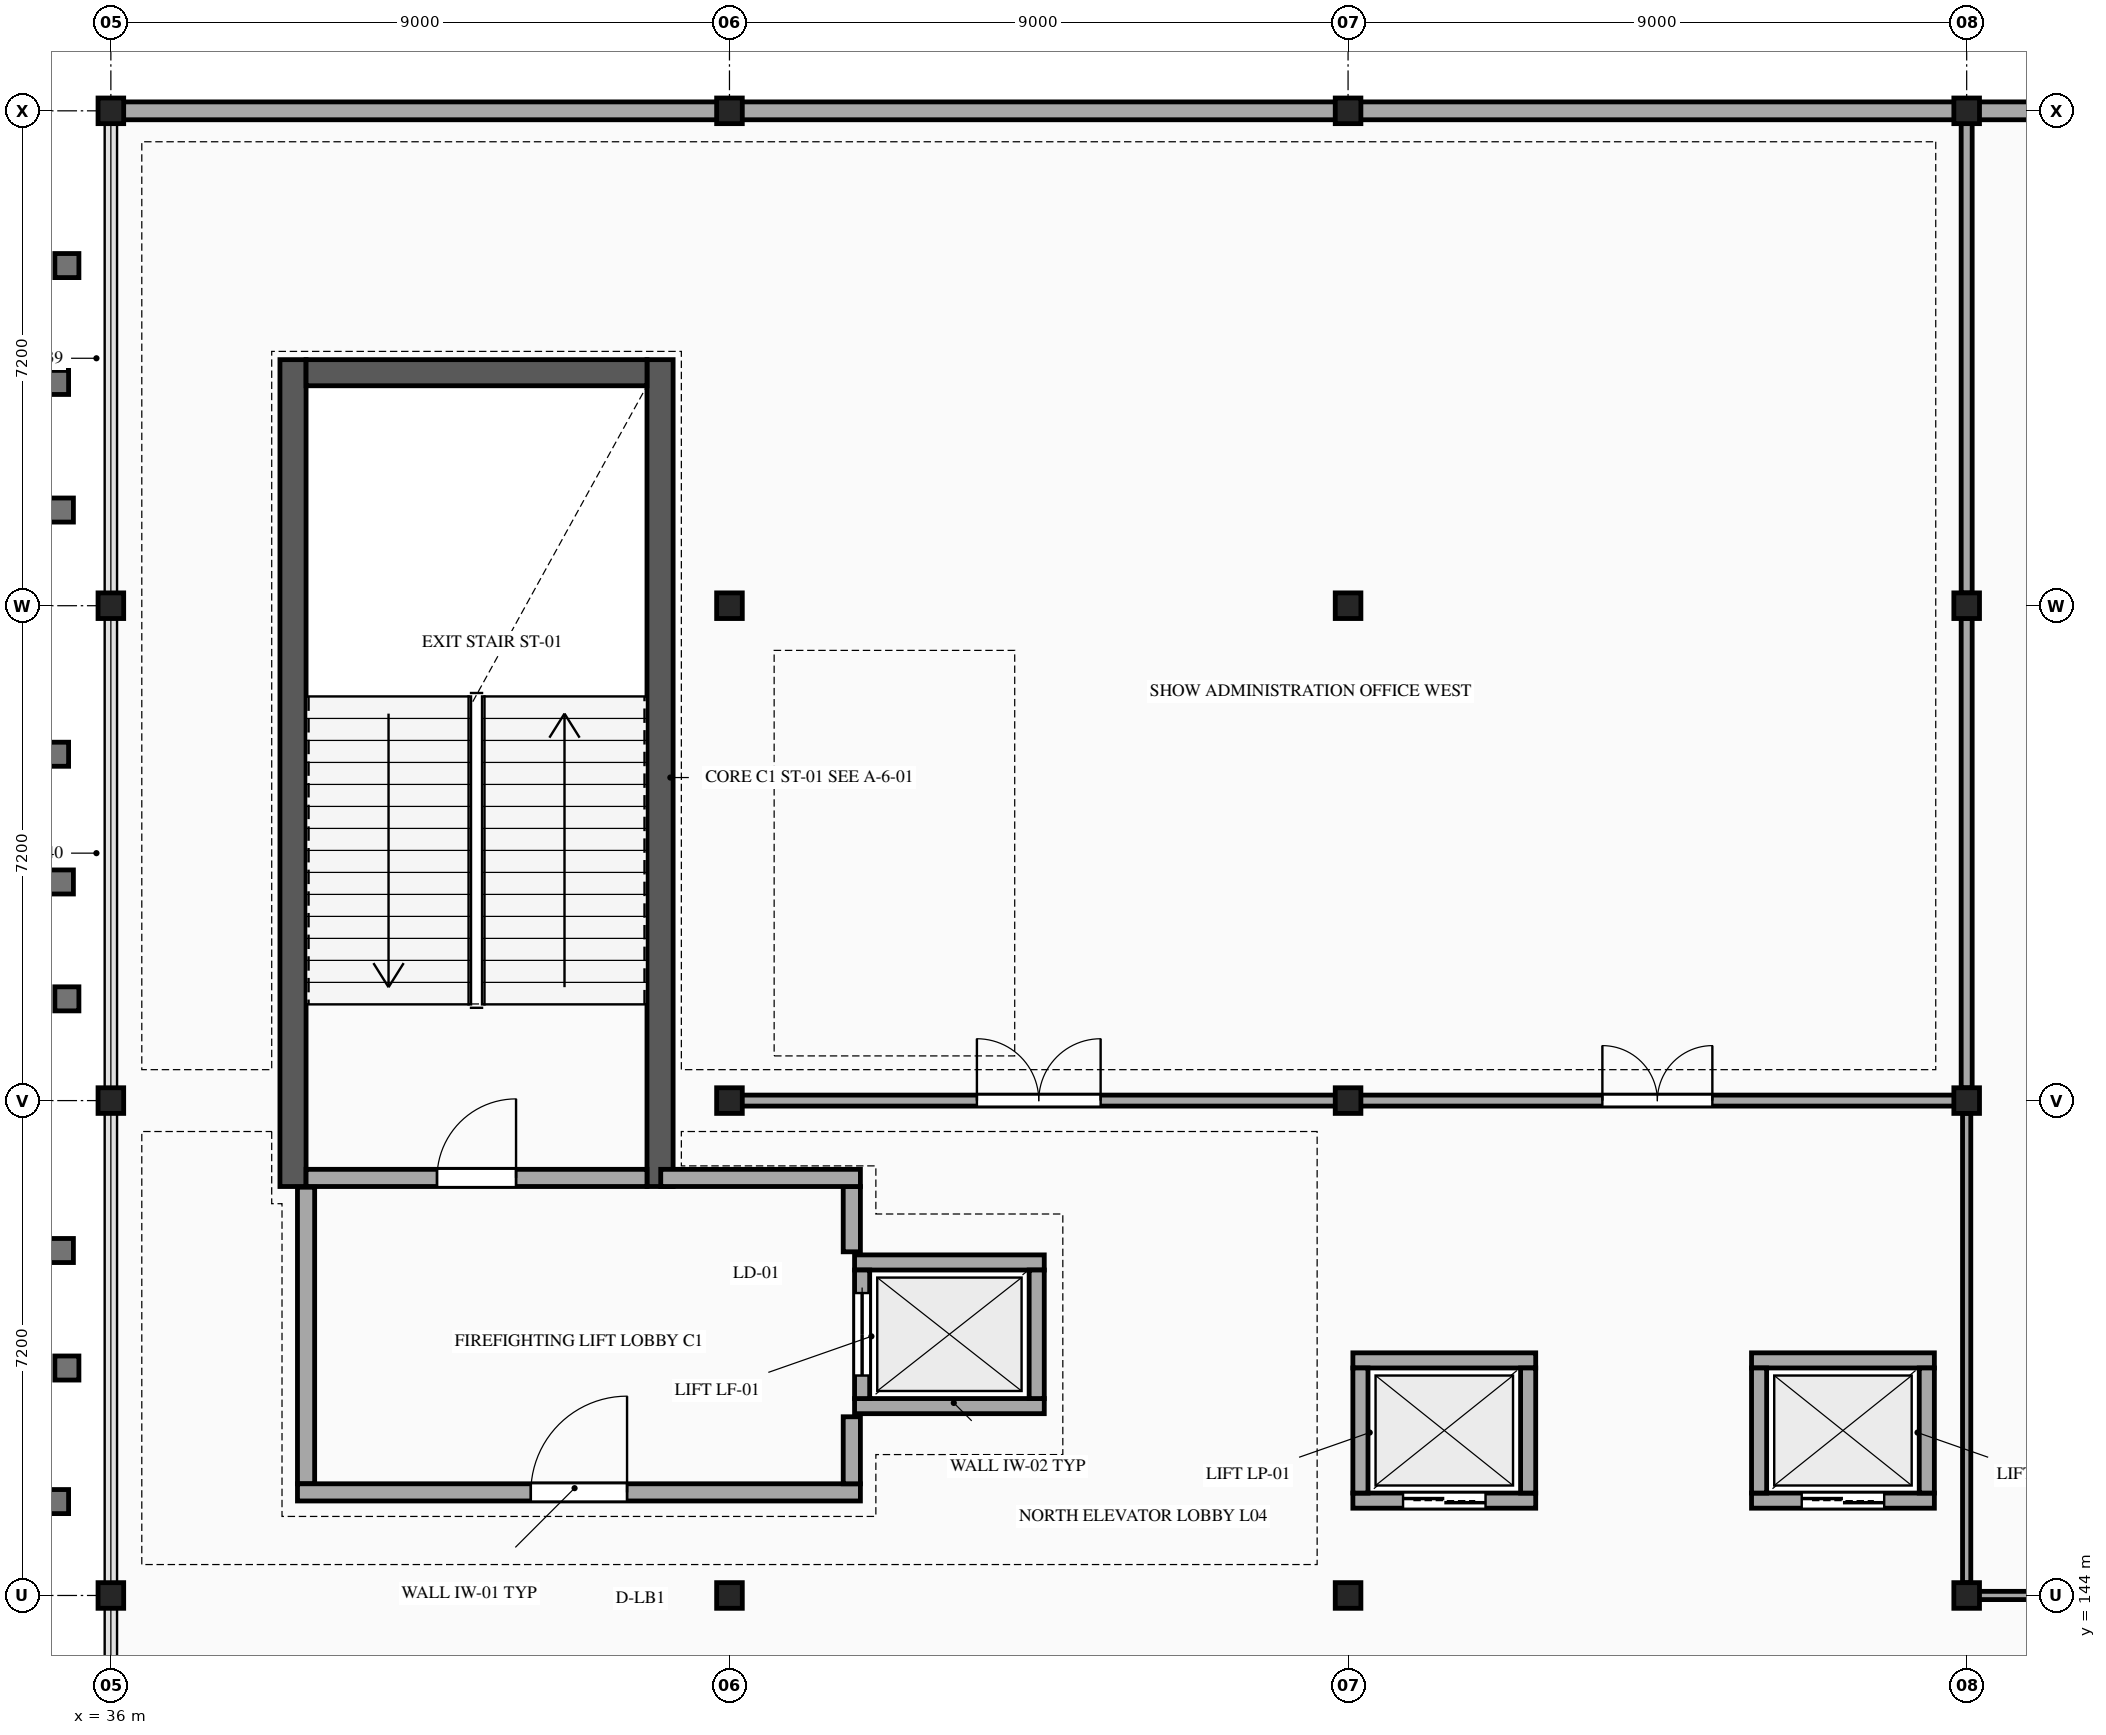
"""IFC4 building model, lengths in metres.
Left out: names, types, materials, properties, quantities, classifications, styles, units other than length and angle.
Written with IfcOpenShell. Run it as: python <this file> out.ifc"""

import sys

from ifc_helpers import new_model, si_unit, direction, frame, frame_2d, origin, origin_2d, place, context, subcontext, project, spatial, rectangle, i_section, extrude, element, fill, save


model = new_model("IFC4")
c1 = context("Model", 3, precision=1e-05, world=origin(), true_north=direction((0.0, 1.0)))
c2 = subcontext(c1, "Body", "Model", "MODEL_VIEW")
j1 = project(units=[si_unit("LENGTHUNIT", "METRE"), si_unit("PLANEANGLEUNIT", "RADIAN")], contexts=[c1])
p1 = place(None, origin())
s1 = spatial("IfcSite", under=j1, at=p1, CompositionType="ELEMENT")
p2 = place(p1, origin())
s2 = spatial("IfcBuilding", under=s1, at=p2, CompositionType="ELEMENT")
p3 = place(p2, frame((0.0, 0.0, 19.8)))
s3 = spatial("IfcBuildingStorey", under=s2, at=p3, CompositionType="ELEMENT", Elevation=19.8)
for number, where, z_axis, x_axis in (
    (1, (36.0, 144.0, 0.0), (0.0, 0.0, 1.0), (1.0, 0.0, 0.0)),
    (2, (36.0, 151.2, 0.0), (0.0, 0.0, 1.0), (1.0, 0.0, 0.0)),
    (3, (36.0, 158.4, 0.0), (0.0, 0.0, 1.0), (1.0, 0.0, 0.0)),
    (4, (36.0, 165.6, 0.0), (0.0, 0.0, 1.0), (1.0, 0.0, 0.0)),
    (5, (45.0, 144.0, 0.0), (0.0, 0.0, 1.0), (1.0, 0.0, 0.0)),
    (6, (45.0, 151.2, 0.0), (0.0, 0.0, 1.0), (1.0, 0.0, 0.0)),
    (7, (45.0, 158.4, 0.0), (0.0, 0.0, 1.0), (1.0, 0.0, 0.0)),
    (8, (45.0, 165.6, 0.0), (0.0, 0.0, 1.0), (1.0, 0.0, 0.0)),
    (9, (54.0, 144.0, 0.0), (0.0, 0.0, 1.0), (1.0, 0.0, 0.0)),
    (10, (54.0, 151.2, 0.0), (0.0, 0.0, 1.0), (1.0, 0.0, 0.0)),
    (11, (54.0, 158.4, 0.0), (0.0, 0.0, 1.0), (1.0, 0.0, 0.0)),
    (12, (54.0, 165.6, 0.0), (0.0, 0.0, 1.0), (1.0, 0.0, 0.0)),
    (13, (63.0, 144.0, 0.0), (0.0, 0.0, 1.0), (1.0, 0.0, 0.0)),
    (14, (63.0, 151.2, 0.0), (0.0, 0.0, 1.0), (1.0, 0.0, 0.0)),
    (15, (63.0, 158.4, 0.0), (0.0, 0.0, 1.0), (1.0, 0.0, 0.0)),
    (16, (63.0, 165.6, 0.0), (0.0, 0.0, 1.0), (1.0, 0.0, 0.0)),
):
    element("IfcColumn", number, at=place(p3, frame(where, z_axis=z_axis, x_axis=x_axis)), inside=s3, PredefinedType="COLUMN", context=c2, shape_type="SweptSolid", body=[
        extrude(i_section(OverallWidth=0.373, OverallDepth=0.373, WebThickness=0.016, FlangeThickness=0.026, at=origin_2d()), origin(), (0.0, 0.0, 1.0), 4.5),
    ])
for number, where, z_axis, x_axis in (
    (17, (38.65, 149.95, 0.0), (0.0, 0.0, 1.0), (0.0, 1.0, 0.0)),
    (18, (43.99, 161.98, 0.0), (0.0, 0.0, 1.0), (0.0, -1.0, 0.0)),
):
    element("IfcWall", number, at=place(p3, frame(where, z_axis=z_axis, x_axis=x_axis)), inside=s3, PredefinedType="SHEAR", context=c2, shape_type="SweptSolid", body=[
        extrude(rectangle(XDim=12.03, YDim=0.38, at=frame_2d((6.015, 0.0))), origin(), (0.0, 0.0, 1.0), 4.26),
    ])
p4 = place(p3, frame((38.84, 161.79, 0.0), z_axis=(0.0, 0.0, 1.0), x_axis=(1.0, 0.0, 0.0)))
e19 = element("IfcWall", 19, at=p4, inside=s3, PredefinedType="SHEAR", context=c2, shape_type="SweptSolid", body=[
    extrude(rectangle(XDim=4.96, YDim=0.38, at=frame_2d((2.48, 0.0))), origin(), (0.0, 0.0, 1.0), 4.26),
])
for number, where, z_axis, x_axis in (
    (20, (36.006, 165.6, 0.0), (0.0, 0.0, 1.0), (1.0, 0.0, 0.0)),
    (21, (45.006, 165.6, 0.0), (0.0, 0.0, 1.0), (1.0, 0.0, 0.0)),
    (22, (54.006, 165.6, 0.0), (0.0, 0.0, 1.0), (1.0, 0.0, 0.0)),
):
    element("IfcWall", number, at=place(p3, frame(where, z_axis=z_axis, x_axis=x_axis)), inside=s3, PredefinedType="STANDARD", context=c2, shape_type="SweptSolid", body=[
        extrude(rectangle(XDim=8.988, YDim=0.26, at=frame_2d((4.494, 0.0))), origin(), (0.0, 0.0, 1.0), 3.648),
    ])
p5 = place(p3, frame((63.006, 165.6, 0.0), z_axis=(0.0, 0.0, 1.0), x_axis=(1.0, 0.0, 0.0)))
e23 = element("IfcWall", 23, at=p5, inside=s3, PredefinedType="STANDARD", context=c2, shape_type="SweptSolid", body=[
    extrude(rectangle(XDim=8.989, YDim=0.26, at=frame_2d((4.495, 0.0))), origin(), (0.0, 0.0, 1.0), 3.648),
])
p6 = place(p3, frame((38.84, 150.075, 0.0), z_axis=(0.0, 0.0, 1.0), x_axis=(1.0, 0.0, 0.0)))
e24 = element("IfcWall", 24, at=p6, inside=s3, PredefinedType="STANDARD", context=c2, shape_type="SweptSolid", body=[
    extrude(rectangle(XDim=4.96, YDim=0.25, at=frame_2d((2.48, 0.0))), origin(), (0.0, 0.0, 1.0), 4.25),
])
p7 = place(p6, frame((1.905, 0.0, 0.0)))
e25 = element("IfcOpeningElement", 25, at=p7, cuts=e24, PredefinedType="OPENING", context=c2, shape_type="SweptSolid", body=[
    extrude(rectangle(XDim=1.15, YDim=2.2, at=frame_2d((0.575, 1.1))), frame((0.0, 0.135, 0.0), z_axis=(0.0, -1.0, 0.0), x_axis=(1.0, 0.0, 0.0)), (0.0, 0.0, 1.0), 0.27),
])
for number, where, z_axis, x_axis in (
    (26, (46.82, 146.755, 0.0), (0.0, 0.0, 1.0), (1.0, 0.0, 0.0)),
    (27, (49.58, 148.845, 0.0), (0.0, 0.0, 1.0), (-1.0, 0.0, 0.0)),
):
    element("IfcWall", number, at=place(p3, frame(where, z_axis=z_axis, x_axis=x_axis)), inside=s3, PredefinedType="STANDARD", context=c2, shape_type="SweptSolid", body=[
        extrude(rectangle(XDim=2.76, YDim=0.22, at=frame_2d((1.38, 0.0))), origin(), (0.0, 0.0, 1.0), 4.25),
    ])
p8 = place(p3, frame((46.93, 148.735, 0.0), z_axis=(0.0, 0.0, 1.0), x_axis=(0.0, -1.0, 0.0)))
e28 = element("IfcWall", 28, at=p8, inside=s3, PredefinedType="STANDARD", context=c2, shape_type="SweptSolid", body=[
    extrude(rectangle(XDim=1.87, YDim=0.22, at=frame_2d((0.935, 0.0))), origin(), (0.0, 0.0, 1.0), 4.25),
])
p9 = place(p8, frame((0.335, 0.0, 0.0)))
e29 = element("IfcOpeningElement", 29, at=p9, cuts=e28, PredefinedType="OPENING", context=c2, shape_type="SweptSolid", body=[
    extrude(rectangle(XDim=1.2, YDim=2.2, at=frame_2d((0.6, 1.1))), frame((0.0, 0.12, 0.0), z_axis=(0.0, -1.0, 0.0), x_axis=(1.0, 0.0, 0.0)), (0.0, 0.0, 1.0), 0.24),
])
p10 = place(p3, frame((49.47, 146.865, 0.0), z_axis=(0.0, 0.0, 1.0), x_axis=(0.0, 1.0, 0.0)))
e30 = element("IfcWall", 30, at=p10, inside=s3, PredefinedType="STANDARD", context=c2, shape_type="SweptSolid", body=[
    extrude(rectangle(XDim=1.87, YDim=0.22, at=frame_2d((0.935, 0.0))), origin(), (0.0, 0.0, 1.0), 4.25),
])
p11 = place(p3, frame((54.07, 145.38, 0.0), z_axis=(0.0, 0.0, 1.0), x_axis=(1.0, 0.0, 0.0)))
e31 = element("IfcWall", 31, at=p11, inside=s3, PredefinedType="STANDARD", context=c2, shape_type="SweptSolid", body=[
    extrude(rectangle(XDim=2.66, YDim=0.22, at=frame_2d((1.33, 0.0))), origin(), (0.0, 0.0, 1.0), 3.648),
])
p12 = place(p11, frame((0.73, 0.0, 0.0)))
e32 = element("IfcOpeningElement", 32, at=p12, cuts=e31, PredefinedType="OPENING", context=c2, shape_type="SweptSolid", body=[
    extrude(rectangle(XDim=1.2, YDim=2.2, at=frame_2d((0.6, 1.1))), frame((0.0, 0.12, 0.0), z_axis=(0.0, -1.0, 0.0), x_axis=(1.0, 0.0, 0.0)), (0.0, 0.0, 1.0), 0.24),
])
p13 = place(p3, frame((56.73, 147.42, 0.0), z_axis=(0.0, 0.0, 1.0), x_axis=(-1.0, 0.0, 0.0)))
e33 = element("IfcWall", 33, at=p13, inside=s3, PredefinedType="STANDARD", context=c2, shape_type="SweptSolid", body=[
    extrude(rectangle(XDim=2.66, YDim=0.22, at=frame_2d((1.33, 0.0))), origin(), (0.0, 0.0, 1.0), 3.648),
])
for number, where, z_axis, x_axis in (
    (34, (54.18, 147.31, 0.0), (0.0, 0.0, 1.0), (0.0, -1.0, 0.0)),
    (35, (56.62, 145.49, 0.0), (0.0, 0.0, 1.0), (0.0, 1.0, 0.0)),
):
    element("IfcWall", number, at=place(p3, frame(where, z_axis=z_axis, x_axis=x_axis)), inside=s3, PredefinedType="STANDARD", context=c2, shape_type="SweptSolid", body=[
        extrude(rectangle(XDim=1.82, YDim=0.22, at=frame_2d((0.91, 0.0))), origin(), (0.0, 0.0, 1.0), 3.648),
    ])
p14 = place(p3, frame((59.87, 145.38, 0.0), z_axis=(0.0, 0.0, 1.0), x_axis=(1.0, 0.0, 0.0)))
e36 = element("IfcWall", 36, at=p14, inside=s3, PredefinedType="STANDARD", context=c2, shape_type="SweptSolid", body=[
    extrude(rectangle(XDim=2.66, YDim=0.22, at=frame_2d((1.33, 0.0))), origin(), (0.0, 0.0, 1.0), 4.25),
])
p15 = place(p14, frame((0.73, 0.0, 0.0)))
e37 = element("IfcOpeningElement", 37, at=p15, cuts=e36, PredefinedType="OPENING", context=c2, shape_type="SweptSolid", body=[
    extrude(rectangle(XDim=1.2, YDim=2.2, at=frame_2d((0.6, 1.1))), frame((0.0, 0.12, 0.0), z_axis=(0.0, -1.0, 0.0), x_axis=(1.0, 0.0, 0.0)), (0.0, 0.0, 1.0), 0.24),
])
p16 = place(p3, frame((62.53, 147.42, 0.0), z_axis=(0.0, 0.0, 1.0), x_axis=(-1.0, 0.0, 0.0)))
e38 = element("IfcWall", 38, at=p16, inside=s3, PredefinedType="STANDARD", context=c2, shape_type="SweptSolid", body=[
    extrude(rectangle(XDim=2.66, YDim=0.22, at=frame_2d((1.33, 0.0))), origin(), (0.0, 0.0, 1.0), 4.25),
])
for number, where, z_axis, x_axis in (
    (39, (59.98, 147.31, 0.0), (0.0, 0.0, 1.0), (0.0, -1.0, 0.0)),
    (40, (62.42, 145.49, 0.0), (0.0, 0.0, 1.0), (0.0, 1.0, 0.0)),
):
    element("IfcWall", number, at=place(p3, frame(where, z_axis=z_axis, x_axis=x_axis)), inside=s3, PredefinedType="STANDARD", context=c2, shape_type="SweptSolid", body=[
        extrude(rectangle(XDim=1.82, YDim=0.22, at=frame_2d((0.91, 0.0))), origin(), (0.0, 0.0, 1.0), 4.25),
    ])
p17 = place(p3, frame((38.84, 149.94, 0.0), z_axis=(0.0, 0.0, 1.0), x_axis=(0.0, -1.0, 0.0)))
e41 = element("IfcWall", 41, at=p17, inside=s3, PredefinedType="STANDARD", context=c2, shape_type="SweptSolid", body=[
    extrude(rectangle(XDim=4.315, YDim=0.25, at=frame_2d((2.157, 0.0))), origin(), (0.0, 0.0, 1.0), 3.648),
])
p18 = place(p3, frame((38.715, 145.5, 0.0), z_axis=(0.0, 0.0, 1.0), x_axis=(1.0, 0.0, 0.0)))
e42 = element("IfcWall", 42, at=p18, inside=s3, PredefinedType="STANDARD", context=c2, shape_type="SweptSolid", body=[
    extrude(rectangle(XDim=8.19, YDim=0.25, at=frame_2d((4.095, 0.0))), origin(), (0.0, 0.0, 1.0), 3.648),
])
p19 = place(p18, frame((3.395, 0.0, 0.0)))
e43 = element("IfcOpeningElement", 43, at=p19, cuts=e42, PredefinedType="OPENING", context=c2, shape_type="SweptSolid", body=[
    extrude(rectangle(XDim=1.4, YDim=2.2, at=frame_2d((0.7, 1.1))), frame((0.0, 0.135, 0.0), z_axis=(0.0, -1.0, 0.0), x_axis=(1.0, 0.0, 0.0)), (0.0, 0.0, 1.0), 0.27),
])
p20 = place(p3, frame((46.78, 145.625, 0.0), z_axis=(0.0, 0.0, 1.0), x_axis=(0.0, 1.0, 0.0)))
e44 = element("IfcWall", 44, at=p20, inside=s3, PredefinedType="STANDARD", context=c2, shape_type="SweptSolid", body=[
    extrude(rectangle(XDim=0.975, YDim=0.25, at=frame_2d((0.488, 0.0))), origin(), (0.0, 0.0, 1.0), 3.648),
])
p21 = place(p3, frame((46.78, 149.0, 0.0), z_axis=(0.0, 0.0, 1.0), x_axis=(0.0, 1.0, 0.0)))
e45 = element("IfcWall", 45, at=p21, inside=s3, PredefinedType="STANDARD", context=c2, shape_type="SweptSolid", body=[
    extrude(rectangle(XDim=0.95, YDim=0.25, at=frame_2d((0.475, 0.0))), origin(), (0.0, 0.0, 1.0), 3.648),
])
p22 = place(p3, frame((44.0, 150.075, 0.0), z_axis=(0.0, 0.0, 1.0), x_axis=(1.0, 0.0, 0.0)))
e46 = element("IfcWall", 46, at=p22, inside=s3, PredefinedType="STANDARD", context=c2, shape_type="SweptSolid", body=[
    extrude(rectangle(XDim=2.905, YDim=0.25, at=frame_2d((1.453, 0.0))), origin(), (0.0, 0.0, 1.0), 3.648),
])
p23 = place(p3, frame((63.006, 144.0, 0.0), z_axis=(0.0, 0.0, 1.0), x_axis=(1.0, 0.0, 0.0)))
e47 = element("IfcWall", 47, at=p23, inside=s3, PredefinedType="PARTITIONING", context=c2, shape_type="SweptSolid", body=[
    extrude(rectangle(XDim=8.989, YDim=0.12, at=frame_2d((4.495, 0.0))), origin(), (0.0, 0.0, 1.0), 3.648),
])
p24 = place(p23, frame((3.994, 0.0, 0.0)))
e48 = element("IfcOpeningElement", 48, at=p24, cuts=e47, PredefinedType="OPENING", context=c2, shape_type="SweptSolid", body=[
    extrude(rectangle(XDim=1.0, YDim=2.15, at=frame_2d((0.5, 1.075))), frame((0.0, 0.07, 0.0), z_axis=(0.0, -1.0, 0.0), x_axis=(1.0, 0.0, 0.0)), (0.0, 0.0, 1.0), 0.14),
])
p25 = place(p3, frame((45.006, 151.2, 0.0), z_axis=(0.0, 0.0, 1.0), x_axis=(1.0, 0.0, 0.0)))
e49 = element("IfcWall", 49, at=p25, inside=s3, PredefinedType="PARTITIONING", context=c2, shape_type="SweptSolid", body=[
    extrude(rectangle(XDim=8.988, YDim=0.16, at=frame_2d((4.494, 0.0))), origin(), (0.0, 0.0, 1.0), 3.648),
])
p26 = place(p25, frame((3.594, 0.0, 0.0)))
e50 = element("IfcOpeningElement", 50, at=p26, cuts=e49, PredefinedType="OPENING", context=c2, shape_type="SweptSolid", body=[
    extrude(rectangle(XDim=1.8, YDim=2.25, at=frame_2d((0.9, 1.125))), frame((0.0, 0.09, 0.0), z_axis=(0.0, -1.0, 0.0), x_axis=(1.0, 0.0, 0.0)), (0.0, 0.0, 1.0), 0.18),
])
p27 = place(p3, frame((54.006, 151.2, 0.0), z_axis=(0.0, 0.0, 1.0), x_axis=(1.0, 0.0, 0.0)))
e51 = element("IfcWall", 51, at=p27, inside=s3, PredefinedType="PARTITIONING", context=c2, shape_type="SweptSolid", body=[
    extrude(rectangle(XDim=8.988, YDim=0.16, at=frame_2d((4.494, 0.0))), origin(), (0.0, 0.0, 1.0), 3.648),
])
p28 = place(p27, frame((3.694, 0.0, 0.0)))
e52 = element("IfcOpeningElement", 52, at=p28, cuts=e51, PredefinedType="OPENING", context=c2, shape_type="SweptSolid", body=[
    extrude(rectangle(XDim=1.6, YDim=2.2, at=frame_2d((0.8, 1.1))), frame((0.0, 0.09, 0.0), z_axis=(0.0, -1.0, 0.0), x_axis=(1.0, 0.0, 0.0)), (0.0, 0.0, 1.0), 0.18),
])
p29 = place(p3, frame((63.0, 144.185, 0.0), z_axis=(0.0, 0.0, 1.0), x_axis=(0.0, 1.0, 0.0)))
e53 = element("IfcWall", 53, at=p29, inside=s3, PredefinedType="PARTITIONING", context=c2, shape_type="SweptSolid", body=[
    extrude(rectangle(XDim=6.831, YDim=0.12, at=frame_2d((3.416, 0.0))), origin(), (0.0, 0.0, 1.0), 3.648),
])
for number, where, z_axis, x_axis in (
    (54, (63.0, 151.385, 0.0), (0.0, 0.0, 1.0), (0.0, 1.0, 0.0)),
    (55, (63.0, 158.584, 0.0), (0.0, 0.0, 1.0), (0.0, 1.0, 0.0)),
):
    element("IfcWall", number, at=place(p3, frame(where, z_axis=z_axis, x_axis=x_axis)), inside=s3, PredefinedType="PARTITIONING", context=c2, shape_type="SweptSolid", body=[
        extrude(rectangle(XDim=6.831, YDim=0.16, at=frame_2d((3.416, 0.0))), origin(), (0.0, 0.0, 1.0), 3.648),
    ])
p30 = place(p7, origin())
e56 = element("IfcDoor", 56, at=p30, inside=s3, OperationType="SINGLE_SWING_RIGHT", PredefinedType="DOOR", context=c2, shape_type="SweptSolid", body=[
    extrude(rectangle(XDim=1.15, YDim=2.2, at=frame_2d((0.575, 1.1))), frame((0.0, 0.025, 0.0), z_axis=(0.0, -1.0, 0.0), x_axis=(1.0, 0.0, 0.0)), (0.0, 0.0, 1.0), 0.05),
])
fill(e25, e56)
p31 = place(p9, origin())
e57 = element("IfcDoor", 57, at=p31, inside=s3, OperationType="DOUBLE_DOOR_SLIDING", PredefinedType="DOOR", context=c2, shape_type="SweptSolid", body=[
    extrude(rectangle(XDim=1.2, YDim=2.2, at=frame_2d((0.6, 1.1))), frame((0.0, 0.025, 0.0), z_axis=(0.0, -1.0, 0.0), x_axis=(1.0, 0.0, 0.0)), (0.0, 0.0, 1.0), 0.05),
])
fill(e29, e57)
p32 = place(p12, origin())
e58 = element("IfcDoor", 58, at=p32, inside=s3, OperationType="DOUBLE_DOOR_SLIDING", PredefinedType="DOOR", context=c2, shape_type="SweptSolid", body=[
    extrude(rectangle(XDim=1.2, YDim=2.2, at=frame_2d((0.6, 1.1))), frame((0.0, 0.025, 0.0), z_axis=(0.0, -1.0, 0.0), x_axis=(1.0, 0.0, 0.0)), (0.0, 0.0, 1.0), 0.05),
])
fill(e32, e58)
p33 = place(p15, origin())
e59 = element("IfcDoor", 59, at=p33, inside=s3, OperationType="DOUBLE_DOOR_SLIDING", PredefinedType="DOOR", context=c2, shape_type="SweptSolid", body=[
    extrude(rectangle(XDim=1.2, YDim=2.2, at=frame_2d((0.6, 1.1))), frame((0.0, 0.025, 0.0), z_axis=(0.0, -1.0, 0.0), x_axis=(1.0, 0.0, 0.0)), (0.0, 0.0, 1.0), 0.05),
])
fill(e37, e59)
p34 = place(p19, origin())
e60 = element("IfcDoor", 60, at=p34, inside=s3, OperationType="SINGLE_SWING_RIGHT", PredefinedType="DOOR", context=c2, shape_type="SweptSolid", body=[
    extrude(rectangle(XDim=1.4, YDim=2.2, at=frame_2d((0.7, 1.1))), frame((0.0, 0.025, 0.0), z_axis=(0.0, -1.0, 0.0), x_axis=(1.0, 0.0, 0.0)), (0.0, 0.0, 1.0), 0.05),
])
fill(e43, e60)
p35 = place(p26, origin())
e61 = element("IfcDoor", 61, at=p35, inside=s3, OperationType="DOUBLE_DOOR_SINGLE_SWING", PredefinedType="DOOR", context=c2, shape_type="SweptSolid", body=[
    extrude(rectangle(XDim=1.8, YDim=2.25, at=frame_2d((0.9, 1.125))), frame((0.0, 0.025, 0.0), z_axis=(0.0, -1.0, 0.0), x_axis=(1.0, 0.0, 0.0)), (0.0, 0.0, 1.0), 0.05),
])
fill(e50, e61)
p36 = place(p28, origin())
e62 = element("IfcDoor", 62, at=p36, inside=s3, OperationType="DOUBLE_DOOR_SINGLE_SWING", PredefinedType="DOOR", context=c2, shape_type="SweptSolid", body=[
    extrude(rectangle(XDim=1.6, YDim=2.2, at=frame_2d((0.8, 1.1))), frame((0.0, 0.025, 0.0), z_axis=(0.0, -1.0, 0.0), x_axis=(1.0, 0.0, 0.0)), (0.0, 0.0, 1.0), 0.05),
])
fill(e52, e62)
save(model, sys.argv[1])
